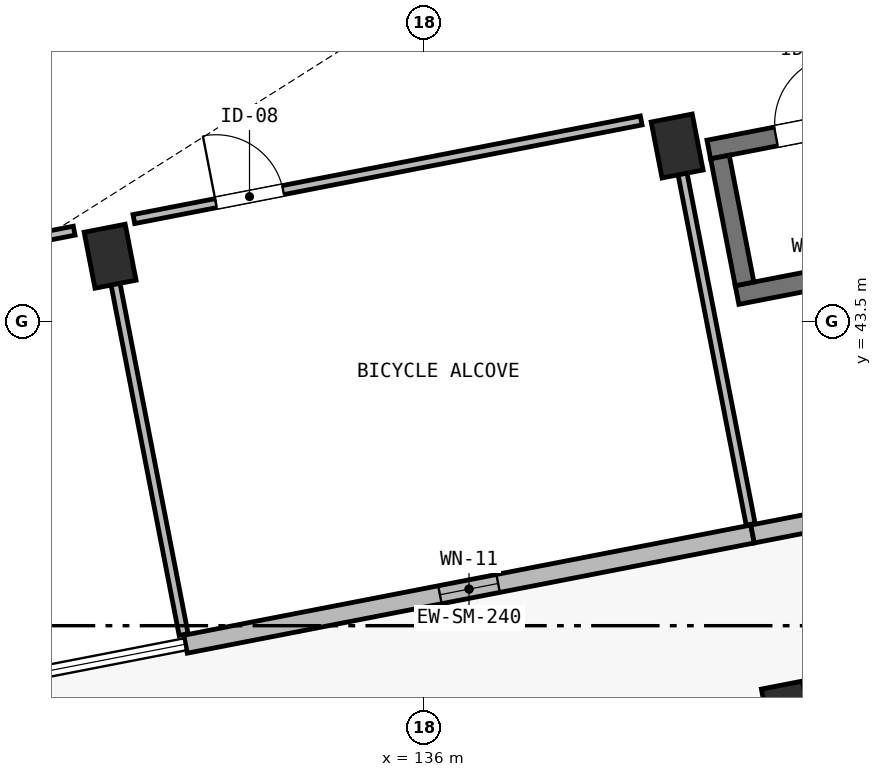
"""IFC4 building model, lengths in metres.
Left out: names, types, materials, properties, quantities, classifications, styles, units other than length and angle.
Written with IfcOpenShell. Run it as: python <this file> out.ifc"""

import sys

from ifc_helpers import new_model, si_unit, direction, frame, frame_2d, origin, origin_2d, place, context, subcontext, project, spatial, rectangle, extrude, element, fill, save


model = new_model("IFC4")
c1 = context("Model", 3, precision=1e-05, world=origin(), true_north=direction((0.0, 1.0)))
c2 = subcontext(c1, "Body", "Model", "MODEL_VIEW")
j1 = project(units=[si_unit("LENGTHUNIT", "METRE"), si_unit("PLANEANGLEUNIT", "RADIAN")], contexts=[c1])
p1 = place(None, origin())
s1 = spatial("IfcSite", under=j1, at=p1, CompositionType="ELEMENT")
p2 = place(p1, origin())
s2 = spatial("IfcBuilding", under=s1, at=p2, CompositionType="ELEMENT")
p3 = place(p2, origin())
s3 = spatial("IfcBuildingStorey", under=s2, at=p3, CompositionType="ELEMENT", Elevation=0.0)
for number, where, z_axis, x_axis in (
    (1, (131.871, 44.361, -0.35), (0.0, 0.0, 1.0), (0.982, 0.191, 0.0)),
    (2, (140.781, 38.35, -0.35), (0.0, 0.0, 1.0), (0.982, 0.191, 0.0)),
    (3, (139.331, 45.811, -0.35), (0.0, 0.0, 1.0), (0.982, 0.191, 0.0)),
):
    element("IfcColumn", number, at=place(p3, frame(where, z_axis=z_axis, x_axis=x_axis)), inside=s3, PredefinedType="COLUMN", context=c2, shape_type="SweptSolid", body=[
        extrude(rectangle(XDim=0.55, YDim=0.75, at=origin_2d()), origin(), (0.0, 0.0, 1.0), 4.85),
    ])
p4 = place(p3, frame((140.12, 43.85, -0.35), z_axis=(0.0, 0.0, 1.0), x_axis=(0.981630445883, 0.190792210834, 0.0)))
e4 = element("IfcWall", 4, at=p4, inside=s3, PredefinedType="SHEAR", context=c2, shape_type="SweptSolid", body=[
    extrude(rectangle(XDim=2.7, YDim=0.25, at=frame_2d((1.35, 0.0))), origin(), (0.0, 0.0, 1.0), 4.85),
])
p5 = place(p3, frame((139.748, 45.764, -0.35), z_axis=(0.0, 0.0, 1.0), x_axis=(0.981630445883, 0.190792210834, 0.0)))
e5 = element("IfcWall", 5, at=p5, inside=s3, PredefinedType="SHEAR", context=c2, shape_type="SweptSolid", body=[
    extrude(rectangle(XDim=2.7, YDim=0.25, at=frame_2d((1.35, 0.0))), origin(), (0.0, 0.0, 1.0), 4.85),
])
p6 = place(p5, frame((0.9, 0.0, 0.35)))
e6 = element("IfcOpeningElement", 6, at=p6, cuts=e5, PredefinedType="OPENING", context=c2, shape_type="SweptSolid", body=[
    extrude(rectangle(XDim=0.9, YDim=2.05, at=frame_2d((0.45, 1.025))), frame((0.0, 0.14, 0.0), z_axis=(0.0, -1.0, 0.0), x_axis=(1.0, 0.0, 0.0)), (0.0, 0.0, 1.0), 0.28),
])
p7 = place(p3, frame((140.218, 43.997, -0.35), z_axis=(0.0, 0.0, 1.0), x_axis=(-0.190727425199, 0.981643035567, 0.0)))
e7 = element("IfcWall", 7, at=p7, inside=s3, PredefinedType="SHEAR", context=c2, shape_type="SweptSolid", body=[
    extrude(rectangle(XDim=1.7, YDim=0.25, at=frame_2d((0.85, 0.0))), origin(), (0.0, 0.0, 1.0), 4.85),
])
p8 = place(p3, frame((140.323, 40.706, 0.0), z_axis=(0.0, 0.0, 1.0), x_axis=(-0.981626422232, -0.190812911449, 0.0)))
e8 = element("IfcWall", 8, at=p8, inside=s3, PredefinedType="SOLIDWALL", context=c2, shape_type="SweptSolid", body=[
    extrude(rectangle(XDim=7.6, YDim=0.24, at=frame_2d((3.8, 0.0))), origin(), (0.0, 0.0, 1.0), 3.35),
])
p9 = place(p8, frame((3.41, 0.0, 0.55)))
e9 = element("IfcOpeningElement", 9, at=p9, cuts=e8, PredefinedType="OPENING", context=c2, shape_type="SweptSolid", body=[
    extrude(rectangle(XDim=0.78, YDim=2.2, at=frame_2d((0.39, 1.1))), frame((0.0, 0.135, 0.0), z_axis=(0.0, -1.0, 0.0), x_axis=(1.0, 0.0, 0.0)), (0.0, 0.0, 1.0), 0.27),
])
p10 = place(p3, frame((147.783, 42.156, 0.0), z_axis=(0.0, 0.0, 1.0), x_axis=(-0.981625252578, -0.19081892857, 0.0)))
e10 = element("IfcWall", 10, at=p10, inside=s3, PredefinedType="SOLIDWALL", context=c2, shape_type="SweptSolid", body=[
    extrude(rectangle(XDim=7.6, YDim=0.24, at=frame_2d((3.8, 0.0))), origin(), (0.0, 0.0, 1.0), 3.35),
])
p11 = place(p10, frame((2.9, 0.0, 0.0)))
e11 = element("IfcOpeningElement", 11, at=p11, cuts=e10, PredefinedType="OPENING", context=c2, shape_type="SweptSolid", body=[
    extrude(rectangle(XDim=1.8, YDim=2.4, at=frame_2d((0.9, 1.2))), frame((0.0, 0.135, 0.0), z_axis=(0.0, -1.0, 0.0), x_axis=(1.0, 0.0, 0.0)), (0.0, 0.0, 1.0), 0.27),
])
p12 = place(p3, frame((124.723, 43.399, 0.0), z_axis=(0.0, 0.0, 1.0), x_axis=(0.981630895566, 0.190789897189, 0.0)))
e12 = element("IfcWall", 12, at=p12, inside=s3, PredefinedType="PARTITIONING", context=c2, shape_type="SweptSolid", body=[
    extrude(rectangle(XDim=6.8, YDim=0.12, at=frame_2d((3.4, 0.0))), origin(), (0.0, 0.0, 1.0), 4.22),
])
p13 = place(p12, frame((1.1, 0.0, 0.0)))
e13 = element("IfcOpeningElement", 13, at=p13, cuts=e12, PredefinedType="OPENING", context=c2, shape_type="SweptSolid", body=[
    extrude(rectangle(XDim=0.9, YDim=2.1, at=frame_2d((0.45, 1.05))), frame((0.0, 0.075, 0.0), z_axis=(0.0, -1.0, 0.0), x_axis=(1.0, 0.0, 0.0)), (0.0, 0.0, 1.0), 0.15),
])
p14 = place(p3, frame((132.183, 44.849, 0.0), z_axis=(0.0, 0.0, 1.0), x_axis=(0.981630895566, 0.190789897189, 0.0)))
e14 = element("IfcWall", 14, at=p14, inside=s3, PredefinedType="PARTITIONING", context=c2, shape_type="SweptSolid", body=[
    extrude(rectangle(XDim=6.8, YDim=0.12, at=frame_2d((3.4, 0.0))), origin(), (0.0, 0.0, 1.0), 4.22),
])
p15 = place(p14, frame((1.1, 0.0, 0.0)))
e15 = element("IfcOpeningElement", 15, at=p15, cuts=e14, PredefinedType="OPENING", context=c2, shape_type="SweptSolid", body=[
    extrude(rectangle(XDim=0.9, YDim=2.1, at=frame_2d((0.45, 1.05))), frame((0.0, 0.075, 0.0), z_axis=(0.0, -1.0, 0.0), x_axis=(1.0, 0.0, 0.0)), (0.0, 0.0, 1.0), 0.15),
])
for number, where, z_axis, x_axis in (
    (16, (132.838, 39.384, 0.0), (0.0, 0.0, 1.0), (-0.191, 0.982, 0.0)),
    (17, (140.298, 40.834, 0.0), (0.0, 0.0, 1.0), (-0.191, 0.982, 0.0)),
):
    element("IfcWall", number, at=place(p3, frame(where, z_axis=z_axis, x_axis=x_axis)), inside=s3, PredefinedType="PARTITIONING", context=c2, shape_type="SweptSolid", body=[
        extrude(rectangle(XDim=4.74, YDim=0.12, at=frame_2d((2.37, 0.0))), origin(), (0.0, 0.0, 1.0), 3.32),
    ])
p16 = place(p9, origin())
e18 = element("IfcWindow", 18, at=p16, inside=s3, PartitioningType="SINGLE_PANEL", PredefinedType="WINDOW", context=c2, shape_type="SweptSolid", body=[
    extrude(rectangle(XDim=0.78, YDim=2.2, at=frame_2d((0.39, 1.1))), frame((0.0, 0.03, 0.0), z_axis=(0.0, -1.0, 0.0), x_axis=(1.0, 0.0, 0.0)), (0.0, 0.0, 1.0), 0.06),
])
fill(e9, e18)
p17 = place(p15, origin())
e19 = element("IfcDoor", 19, at=p17, inside=s3, OperationType="SINGLE_SWING_LEFT", PredefinedType="DOOR", context=c2, shape_type="SweptSolid", body=[
    extrude(rectangle(XDim=0.9, YDim=2.1, at=frame_2d((0.45, 1.05))), frame((0.0, 0.025, 0.0), z_axis=(0.0, -1.0, 0.0), x_axis=(1.0, 0.0, 0.0)), (0.0, 0.0, 1.0), 0.05),
])
fill(e15, e19)
p18 = place(p6, origin())
e20 = element("IfcDoor", 20, at=p18, inside=s3, OperationType="SINGLE_SWING_RIGHT", PredefinedType="DOOR", context=c2, shape_type="SweptSolid", body=[
    extrude(rectangle(XDim=0.9, YDim=2.05, at=frame_2d((0.45, 1.025))), frame((0.0, 0.025, 0.0), z_axis=(0.0, -1.0, 0.0), x_axis=(1.0, 0.0, 0.0)), (0.0, 0.0, 1.0), 0.05),
])
fill(e6, e20)
save(model, sys.argv[1])
